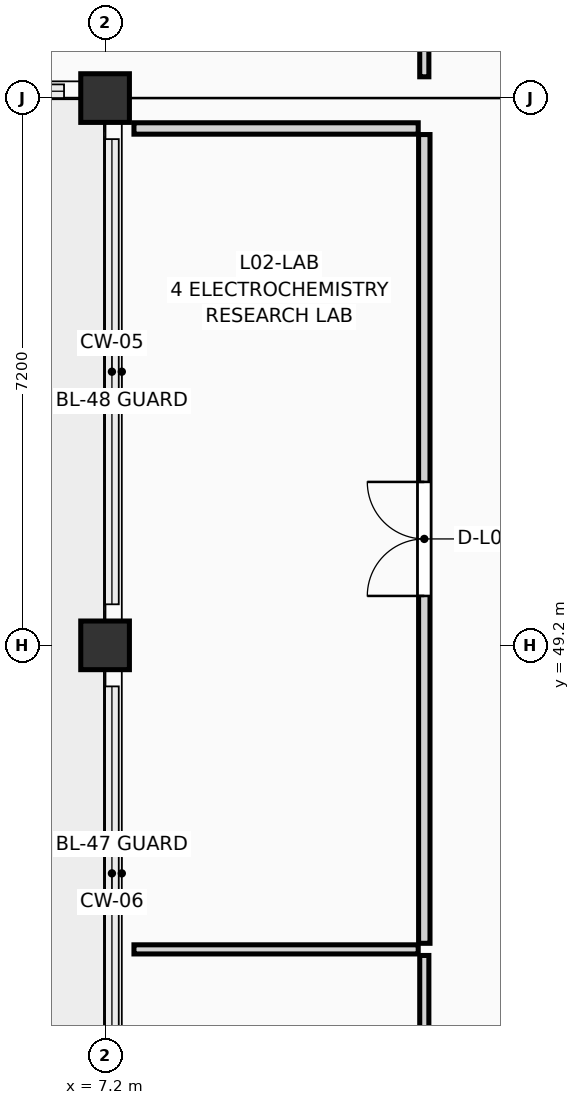
"""IFC4 building model, lengths in metres.
Left out: names, types, materials, properties, quantities, classifications, styles, units other than length and angle.
Written with IfcOpenShell. Run it as: python <this file> out.ifc"""

import sys

from ifc_helpers import new_model, si_unit, direction, frame, frame_2d, origin, origin_2d, place, context, subcontext, project, spatial, rectangle, extrude, element, fill, save


model = new_model("IFC4")
c1 = context("Model", 3, precision=1e-05, world=origin(), true_north=direction((0.0, 1.0)))
c2 = subcontext(c1, "Body", "Model", "MODEL_VIEW")
j1 = project(units=[si_unit("LENGTHUNIT", "METRE"), si_unit("PLANEANGLEUNIT", "RADIAN")], contexts=[c1])
p1 = place(None, origin())
s1 = spatial("IfcSite", under=j1, at=p1, CompositionType="ELEMENT")
p2 = place(p1, origin())
s2 = spatial("IfcBuilding", under=s1, at=p2, CompositionType="ELEMENT")
p3 = place(p2, frame((0.0, 0.0, 8.55)))
s3 = spatial("IfcBuildingStorey", under=s2, at=p3, CompositionType="ELEMENT", Elevation=8.55)
for number, where, z_axis, x_axis in (
    (1, (7.2, 49.2, 0.0), (0.0, 0.0, 1.0), (1.0, 0.0, 0.0)),
    (2, (7.2, 56.4, 0.0), (0.0, 0.0, 1.0), (1.0, 0.0, 0.0)),
):
    element("IfcColumn", number, at=place(p3, frame(where, z_axis=z_axis, x_axis=x_axis)), inside=s3, PredefinedType="COLUMN", context=c2, shape_type="SweptSolid", body=[
        extrude(rectangle(XDim=0.64, YDim=0.64, at=origin_2d()), origin(), (0.0, 0.0, 1.0), 3.6),
    ])
p4 = place(p3, frame((11.4, 34.28, 0.0), z_axis=(0.0, 0.0, 1.0), x_axis=(0.0, 1.0, 0.0)))
e3 = element("IfcWall", 3, at=p4, inside=s3, PredefinedType="PARTITIONING", context=c2, shape_type="SweptSolid", body=[
    extrude(rectangle(XDim=10.84, YDim=0.12, at=frame_2d((5.42, 0.0))), origin(), (0.0, 0.0, 1.0), 3.375),
])
p5 = place(p4, frame((4.82, 0.0, 0.0)))
e4 = element("IfcOpeningElement", 4, at=p5, cuts=e3, PredefinedType="OPENING", context=c2, shape_type="SweptSolid", body=[
    extrude(rectangle(XDim=1.2, YDim=2.15, at=frame_2d((0.6, 1.075))), frame((0.0, 0.072, 0.0), z_axis=(0.0, -1.0, 0.0), x_axis=(1.0, 0.0, 0.0)), (0.0, 0.0, 1.0), 0.144),
])
p6 = place(p3, frame((7.58, 45.2, 0.0), z_axis=(0.0, 0.0, 1.0), x_axis=(1.0, 0.0, 0.0)))
e5 = element("IfcWall", 5, at=p6, inside=s3, PredefinedType="PARTITIONING", context=c2, shape_type="SweptSolid", body=[
    extrude(rectangle(XDim=3.74, YDim=0.12, at=frame_2d((1.87, 0.0))), origin(), (0.0, 0.0, 1.0), 3.375),
])
p7 = place(p3, frame((11.4, 45.28, 0.0), z_axis=(0.0, 0.0, 1.0), x_axis=(0.0, 1.0, 0.0)))
e6 = element("IfcWall", 6, at=p7, inside=s3, PredefinedType="PARTITIONING", context=c2, shape_type="SweptSolid", body=[
    extrude(rectangle(XDim=10.64, YDim=0.15, at=frame_2d((5.32, 0.0))), origin(), (0.0, 0.0, 1.0), 3.375),
])
p8 = place(p7, frame((4.57, 0.0, 0.0)))
e7 = element("IfcOpeningElement", 7, at=p8, cuts=e6, PredefinedType="OPENING", context=c2, shape_type="SweptSolid", body=[
    extrude(rectangle(XDim=1.5, YDim=2.2, at=frame_2d((0.75, 1.1))), frame((0.0, 0.087, 0.0), z_axis=(0.0, -1.0, 0.0), x_axis=(1.0, 0.0, 0.0)), (0.0, 0.0, 1.0), 0.174),
])
p9 = place(p3, frame((7.58, 56.0, 0.0), z_axis=(0.0, 0.0, 1.0), x_axis=(1.0, 0.0, 0.0)))
e8 = element("IfcWall", 8, at=p9, inside=s3, PredefinedType="PARTITIONING", context=c2, shape_type="SweptSolid", body=[
    extrude(rectangle(XDim=3.74, YDim=0.15, at=frame_2d((1.87, 0.0))), origin(), (0.0, 0.0, 1.0), 3.375),
])
p10 = place(p3, frame((11.4, 56.68, 0.0), z_axis=(0.0, 0.0, 1.0), x_axis=(0.0, 1.0, 0.0)))
e9 = element("IfcWall", 9, at=p10, inside=s3, PredefinedType="PARTITIONING", context=c2, shape_type="SweptSolid", body=[
    extrude(rectangle(XDim=28.44, YDim=0.12, at=frame_2d((14.22, 0.0))), origin(), (0.0, 0.0, 1.0), 3.375),
])
p11 = place(p10, frame((13.37, 0.0, 0.0)))
e10 = element("IfcOpeningElement", 10, at=p11, cuts=e9, PredefinedType="OPENING", context=c2, shape_type="SweptSolid", body=[
    extrude(rectangle(XDim=1.7, YDim=2.28, at=frame_2d((0.85, 1.14))), frame((0.0, 0.072, 0.0), z_axis=(0.0, -1.0, 0.0), x_axis=(1.0, 0.0, 0.0)), (0.0, 0.0, 1.0), 0.144),
])
p12 = place(p8, origin())
e11 = element("IfcDoor", 11, at=p12, inside=s3, OperationType="DOUBLE_DOOR_SINGLE_SWING", PredefinedType="DOOR", context=c2, shape_type="SweptSolid", body=[
    extrude(rectangle(XDim=1.5, YDim=2.2, at=frame_2d((0.75, 1.1))), frame((0.0, 0.025, 0.0), z_axis=(0.0, -1.0, 0.0), x_axis=(1.0, 0.0, 0.0)), (0.0, 0.0, 1.0), 0.05),
])
fill(e7, e11)
save(model, sys.argv[1])
